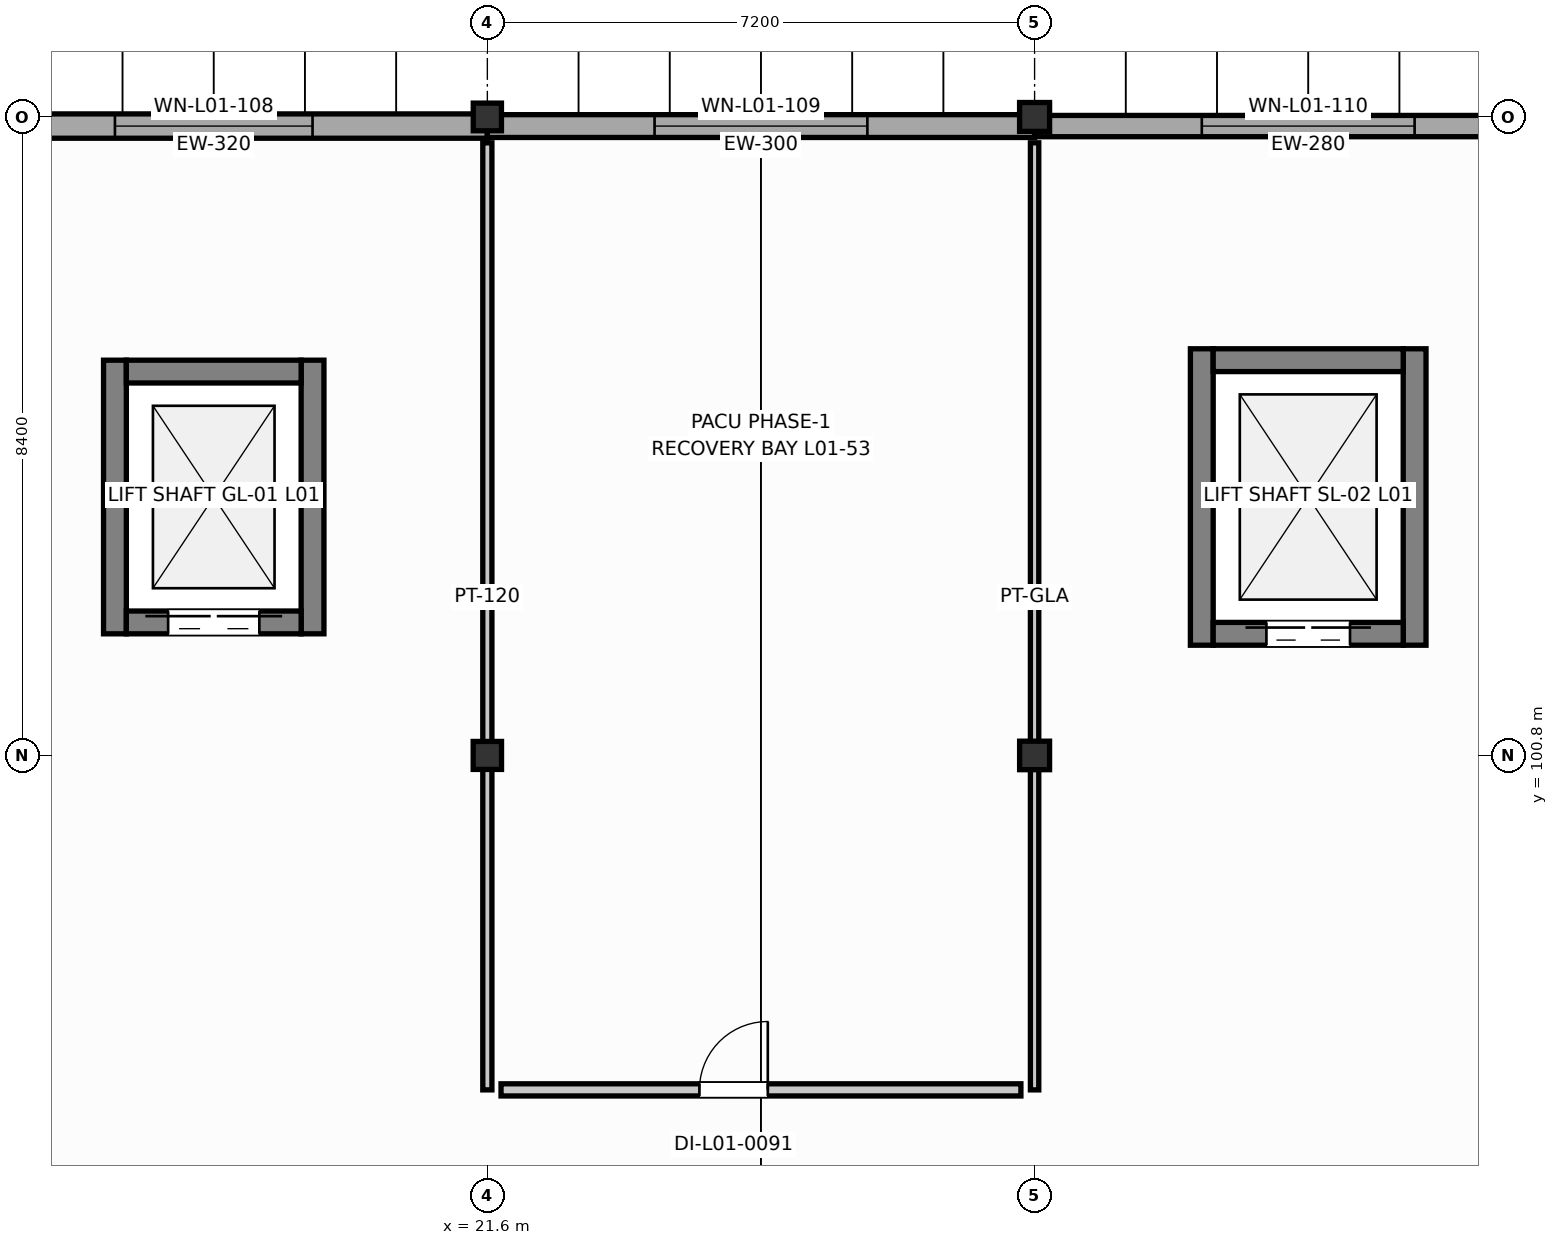
"""IFC4 building model, lengths in metres.
Left out: names, types, materials, properties, quantities, classifications, styles, units other than length and angle.
Written with IfcOpenShell. Run it as: python <this file> out.ifc"""

import sys

from ifc_helpers import new_model, si_unit, direction, frame, frame_2d, origin, origin_2d, place, context, subcontext, project, spatial, rectangle, i_section, extrude, element, fill, save


model = new_model("IFC4")
c1 = context("Model", 3, precision=1e-05, world=origin(), true_north=direction((0.0, 1.0)))
c2 = subcontext(c1, "Body", "Model", "MODEL_VIEW")
j1 = project(units=[si_unit("LENGTHUNIT", "METRE"), si_unit("PLANEANGLEUNIT", "RADIAN")], contexts=[c1])
p1 = place(None, origin())
s1 = spatial("IfcSite", under=j1, at=p1, CompositionType="ELEMENT")
p2 = place(p1, origin())
s2 = spatial("IfcBuilding", under=s1, at=p2, CompositionType="ELEMENT")
p3 = place(p2, frame((0.0, 0.0, 4.8)))
s3 = spatial("IfcBuildingStorey", under=s2, at=p3, CompositionType="ELEMENT", Elevation=4.8)
p4 = place(p3, frame((21.6, 100.8, 0.0), z_axis=(0.0, 0.0, 1.0), x_axis=(1.0, 0.0, 0.0)))
e1 = element("IfcColumn", 1, at=p4, inside=s3, PredefinedType="COLUMN", context=c2, shape_type="SweptSolid", body=[
    extrude(i_section(OverallWidth=0.373, OverallDepth=0.368, WebThickness=0.015, FlangeThickness=0.024, FilletRadius=0.02, at=origin_2d()), origin(), (0.0, 0.0, 1.0), 4.2),
])
p5 = place(p3, frame((21.6, 109.2, 0.0), z_axis=(0.0, 0.0, 1.0), x_axis=(1.0, 0.0, 0.0)))
e2 = element("IfcColumn", 2, at=p5, inside=s3, PredefinedType="COLUMN", context=c2, shape_type="SweptSolid", body=[
    extrude(i_section(OverallWidth=0.371, OverallDepth=0.364, WebThickness=0.013, FlangeThickness=0.022, FilletRadius=0.02, at=origin_2d()), origin(), (0.0, 0.0, 1.0), 4.2),
])
p6 = place(p3, frame((28.8, 100.8, 0.0), z_axis=(0.0, 0.0, 1.0), x_axis=(1.0, 0.0, 0.0)))
e3 = element("IfcColumn", 3, at=p6, inside=s3, PredefinedType="COLUMN", context=c2, shape_type="SweptSolid", body=[
    extrude(i_section(OverallWidth=0.394, OverallDepth=0.375, WebThickness=0.017, FlangeThickness=0.028, FilletRadius=0.02, at=origin_2d()), origin(), (0.0, 0.0, 1.0), 4.2),
])
p7 = place(p3, frame((28.8, 109.2, 0.0), z_axis=(0.0, 0.0, 1.0), x_axis=(1.0, 0.0, 0.0)))
e4 = element("IfcColumn", 4, at=p7, inside=s3, PredefinedType="COLUMN", context=c2, shape_type="SweptSolid", body=[
    extrude(i_section(OverallWidth=0.395, OverallDepth=0.38, WebThickness=0.019, FlangeThickness=0.03, FilletRadius=0.02, at=origin_2d()), origin(), (0.0, 0.0, 1.0), 4.2),
])
for number, where, z_axis, x_axis in (
    (5, (31.0, 102.25, 0.0), (0.0, 0.0, 1.0), (0.0, 1.0, 0.0)),
    (6, (33.8, 102.25, 0.0), (0.0, 0.0, 1.0), (0.0, 1.0, 0.0)),
):
    element("IfcWall", number, at=place(p3, frame(where, z_axis=z_axis, x_axis=x_axis)), inside=s3, PredefinedType="SHEAR", context=c2, shape_type="SweptSolid", body=[
        extrude(rectangle(XDim=3.9, YDim=0.3, at=frame_2d((1.95, 0.0))), origin(), (0.0, 0.0, 1.0), 3.98),
    ])
p8 = place(p3, frame((31.15, 106.0, 0.0), z_axis=(0.0, 0.0, 1.0), x_axis=(1.0, 0.0, 0.0)))
e7 = element("IfcWall", 7, at=p8, inside=s3, PredefinedType="SHEAR", context=c2, shape_type="SweptSolid", body=[
    extrude(rectangle(XDim=2.5, YDim=0.3, at=frame_2d((1.25, 0.0))), origin(), (0.0, 0.0, 1.0), 3.98),
])
p9 = place(p3, frame((31.15, 102.4, 0.0), z_axis=(0.0, 0.0, 1.0), x_axis=(1.0, 0.0, 0.0)))
e8 = element("IfcWall", 8, at=p9, inside=s3, PredefinedType="SHEAR", context=c2, shape_type="SweptSolid", body=[
    extrude(rectangle(XDim=2.5, YDim=0.3, at=frame_2d((1.25, 0.0))), origin(), (0.0, 0.0, 1.0), 3.98),
])
p10 = place(p9, frame((0.7, 0.0, 0.0)))
e9 = element("IfcOpeningElement", 9, at=p10, cuts=e8, PredefinedType="OPENING", context=c2, shape_type="SweptSolid", body=[
    extrude(rectangle(XDim=1.1, YDim=2.15, at=frame_2d((0.55, 1.075))), frame((0.0, 0.16, 0.0), z_axis=(0.0, -1.0, 0.0), x_axis=(1.0, 0.0, 0.0)), (0.0, 0.0, 1.0), 0.32),
])
for number, where, z_axis, x_axis in (
    (10, (16.7, 102.4, 0.0), (0.0, 0.0, 1.0), (0.0, 1.0, 0.0)),
    (11, (19.3, 102.4, 0.0), (0.0, 0.0, 1.0), (0.0, 1.0, 0.0)),
):
    element("IfcWall", number, at=place(p3, frame(where, z_axis=z_axis, x_axis=x_axis)), inside=s3, PredefinedType="SHEAR", context=c2, shape_type="SweptSolid", body=[
        extrude(rectangle(XDim=3.6, YDim=0.3, at=frame_2d((1.8, 0.0))), origin(), (0.0, 0.0, 1.0), 3.98),
    ])
p11 = place(p3, frame((16.85, 105.85, 0.0), z_axis=(0.0, 0.0, 1.0), x_axis=(1.0, 0.0, 0.0)))
e12 = element("IfcWall", 12, at=p11, inside=s3, PredefinedType="SHEAR", context=c2, shape_type="SweptSolid", body=[
    extrude(rectangle(XDim=2.3, YDim=0.3, at=frame_2d((1.15, 0.0))), origin(), (0.0, 0.0, 1.0), 3.98),
])
p12 = place(p3, frame((16.85, 102.55, 0.0), z_axis=(0.0, 0.0, 1.0), x_axis=(1.0, 0.0, 0.0)))
e13 = element("IfcWall", 13, at=p12, inside=s3, PredefinedType="SHEAR", context=c2, shape_type="SweptSolid", body=[
    extrude(rectangle(XDim=2.3, YDim=0.3, at=frame_2d((1.15, 0.0))), origin(), (0.0, 0.0, 1.0), 3.98),
])
p13 = place(p12, frame((0.55, 0.0, 0.0)))
e14 = element("IfcOpeningElement", 14, at=p13, cuts=e13, PredefinedType="OPENING", context=c2, shape_type="SweptSolid", body=[
    extrude(rectangle(XDim=1.2, YDim=2.15, at=frame_2d((0.6, 1.075))), frame((0.0, 0.16, 0.0), z_axis=(0.0, -1.0, 0.0), x_axis=(1.0, 0.0, 0.0)), (0.0, 0.0, 1.0), 0.32),
])
p14 = place(p3, frame((14.4, 109.08, 0.0), z_axis=(0.0, 0.0, 1.0), x_axis=(1.0, 0.0, 0.0)))
e15 = element("IfcWall", 15, at=p14, inside=s3, PredefinedType="SOLIDWALL", context=c2, shape_type="SweptSolid", body=[
    extrude(rectangle(XDim=7.2, YDim=0.32, at=frame_2d((3.6, 0.0))), origin(), (0.0, 0.0, 1.0), 3.482),
])
p15 = place(p14, frame((2.3, 0.0, 0.95)))
e16 = element("IfcOpeningElement", 16, at=p15, cuts=e15, PredefinedType="OPENING", context=c2, shape_type="SweptSolid", body=[
    extrude(rectangle(XDim=2.6, YDim=1.75, at=frame_2d((1.3, 0.875))), frame((0.0, 0.17, 0.0), z_axis=(0.0, -1.0, 0.0), x_axis=(1.0, 0.0, 0.0)), (0.0, 0.0, 1.0), 0.34),
])
p16 = place(p3, frame((21.6, 109.08, 0.0), z_axis=(0.0, 0.0, 1.0), x_axis=(1.0, 0.0, 0.0)))
e17 = element("IfcWall", 17, at=p16, inside=s3, PredefinedType="SOLIDWALL", context=c2, shape_type="SweptSolid", body=[
    extrude(rectangle(XDim=7.2, YDim=0.3, at=frame_2d((3.6, 0.0))), origin(), (0.0, 0.0, 1.0), 3.482),
])
p17 = place(p16, frame((2.2, 0.0, 0.95)))
e18 = element("IfcOpeningElement", 18, at=p17, cuts=e17, PredefinedType="OPENING", context=c2, shape_type="SweptSolid", body=[
    extrude(rectangle(XDim=2.8, YDim=1.15, at=frame_2d((1.4, 0.575))), frame((0.0, 0.16, 0.0), z_axis=(0.0, -1.0, 0.0), x_axis=(1.0, 0.0, 0.0)), (0.0, 0.0, 1.0), 0.32),
])
p18 = place(p3, frame((28.8, 109.08, 0.0), z_axis=(0.0, 0.0, 1.0), x_axis=(1.0, 0.0, 0.0)))
e19 = element("IfcWall", 19, at=p18, inside=s3, PredefinedType="SOLIDWALL", context=c2, shape_type="SweptSolid", body=[
    extrude(rectangle(XDim=7.2, YDim=0.28, at=frame_2d((3.6, 0.0))), origin(), (0.0, 0.0, 1.0), 3.482),
])
p19 = place(p18, frame((2.2, 0.0, 0.95)))
e20 = element("IfcOpeningElement", 20, at=p19, cuts=e19, PredefinedType="OPENING", context=c2, shape_type="SweptSolid", body=[
    extrude(rectangle(XDim=2.8, YDim=1.35, at=frame_2d((1.4, 0.675))), frame((0.0, 0.15, 0.0), z_axis=(0.0, -1.0, 0.0), x_axis=(1.0, 0.0, 0.0)), (0.0, 0.0, 1.0), 0.3),
])
p20 = place(p3, frame((21.6, 96.4, 0.0), z_axis=(0.0, 0.0, 1.0), x_axis=(0.0, 1.0, 0.0)))
e21 = element("IfcWall", 21, at=p20, inside=s3, PredefinedType="PARTITIONING", context=c2, shape_type="SweptSolid", body=[
    extrude(rectangle(XDim=12.46, YDim=0.12, at=frame_2d((6.23, 0.0))), origin(), (0.0, 0.0, 1.0), 3.252),
])
p21 = place(p3, frame((28.8, 108.86, 0.0), z_axis=(0.0, 0.0, 1.0), x_axis=(0.0, -1.0, 0.0)))
e22 = element("IfcWall", 22, at=p21, inside=s3, PredefinedType="MOVABLE", context=c2, shape_type="SweptSolid", body=[
    extrude(rectangle(XDim=12.46, YDim=0.11, at=frame_2d((6.23, 0.0))), origin(), (0.0, 0.0, 1.0), 3.479),
])
p22 = place(p3, frame((28.62, 96.4, 0.0), z_axis=(0.0, 0.0, 1.0), x_axis=(-1.0, 0.0, 0.0)))
e23 = element("IfcWall", 23, at=p22, inside=s3, PredefinedType="PARTITIONING", context=c2, shape_type="SweptSolid", body=[
    extrude(rectangle(XDim=6.84, YDim=0.16, at=frame_2d((3.42, 0.0))), origin(), (0.0, 0.0, 1.0), 3.945),
])
p23 = place(p22, frame((3.33, 0.0, 0.0)))
e24 = element("IfcOpeningElement", 24, at=p23, cuts=e23, PredefinedType="OPENING", context=c2, shape_type="SweptSolid", body=[
    extrude(rectangle(XDim=0.9, YDim=2.04, at=frame_2d((0.45, 1.02))), frame((0.0, 0.09, 0.0), z_axis=(0.0, -1.0, 0.0), x_axis=(1.0, 0.0, 0.0)), (0.0, 0.0, 1.0), 0.18),
])
p24 = place(p10, origin())
e25 = element("IfcDoor", 25, at=p24, inside=s3, OperationType="DOUBLE_DOOR_SLIDING", PredefinedType="DOOR", context=c2, shape_type="SweptSolid", body=[
    extrude(rectangle(XDim=1.1, YDim=2.15, at=frame_2d((0.55, 1.075))), frame((0.0, 0.025, 0.0), z_axis=(0.0, -1.0, 0.0), x_axis=(1.0, 0.0, 0.0)), (0.0, 0.0, 1.0), 0.05),
])
fill(e9, e25)
p25 = place(p13, origin())
e26 = element("IfcDoor", 26, at=p25, inside=s3, OperationType="DOUBLE_DOOR_SLIDING", PredefinedType="DOOR", context=c2, shape_type="SweptSolid", body=[
    extrude(rectangle(XDim=1.2, YDim=2.15, at=frame_2d((0.6, 1.075))), frame((0.0, 0.025, 0.0), z_axis=(0.0, -1.0, 0.0), x_axis=(1.0, 0.0, 0.0)), (0.0, 0.0, 1.0), 0.05),
])
fill(e14, e26)
p26 = place(p15, origin())
e27 = element("IfcWindow", 27, at=p26, inside=s3, PartitioningType="SINGLE_PANEL", PredefinedType="WINDOW", context=c2, shape_type="SweptSolid", body=[
    extrude(rectangle(XDim=2.6, YDim=1.75, at=frame_2d((1.3, 0.875))), frame((0.0, 0.03, 0.0), z_axis=(0.0, -1.0, 0.0), x_axis=(1.0, 0.0, 0.0)), (0.0, 0.0, 1.0), 0.06),
])
fill(e16, e27)
p27 = place(p17, origin())
e28 = element("IfcWindow", 28, at=p27, inside=s3, PartitioningType="SINGLE_PANEL", PredefinedType="WINDOW", context=c2, shape_type="SweptSolid", body=[
    extrude(rectangle(XDim=2.8, YDim=1.15, at=frame_2d((1.4, 0.575))), frame((0.0, 0.03, 0.0), z_axis=(0.0, -1.0, 0.0), x_axis=(1.0, 0.0, 0.0)), (0.0, 0.0, 1.0), 0.06),
])
fill(e18, e28)
p28 = place(p19, origin())
e29 = element("IfcWindow", 29, at=p28, inside=s3, PartitioningType="SINGLE_PANEL", PredefinedType="WINDOW", context=c2, shape_type="SweptSolid", body=[
    extrude(rectangle(XDim=2.8, YDim=1.35, at=frame_2d((1.4, 0.675))), frame((0.0, 0.03, 0.0), z_axis=(0.0, -1.0, 0.0), x_axis=(1.0, 0.0, 0.0)), (0.0, 0.0, 1.0), 0.06),
])
fill(e20, e29)
p29 = place(p23, frame((0.9, 0.0, 0.0), z_axis=(0.0, 0.0, 1.0), x_axis=(-1.0, 0.0, 0.0)))
e30 = element("IfcDoor", 30, at=p29, inside=s3, OperationType="SINGLE_SWING_RIGHT", PredefinedType="DOOR", context=c2, shape_type="SweptSolid", body=[
    extrude(rectangle(XDim=0.9, YDim=2.04, at=frame_2d((0.45, 1.02))), frame((0.0, 0.025, 0.0), z_axis=(0.0, -1.0, 0.0), x_axis=(1.0, 0.0, 0.0)), (0.0, 0.0, 1.0), 0.05),
])
fill(e24, e30)
save(model, sys.argv[1])
